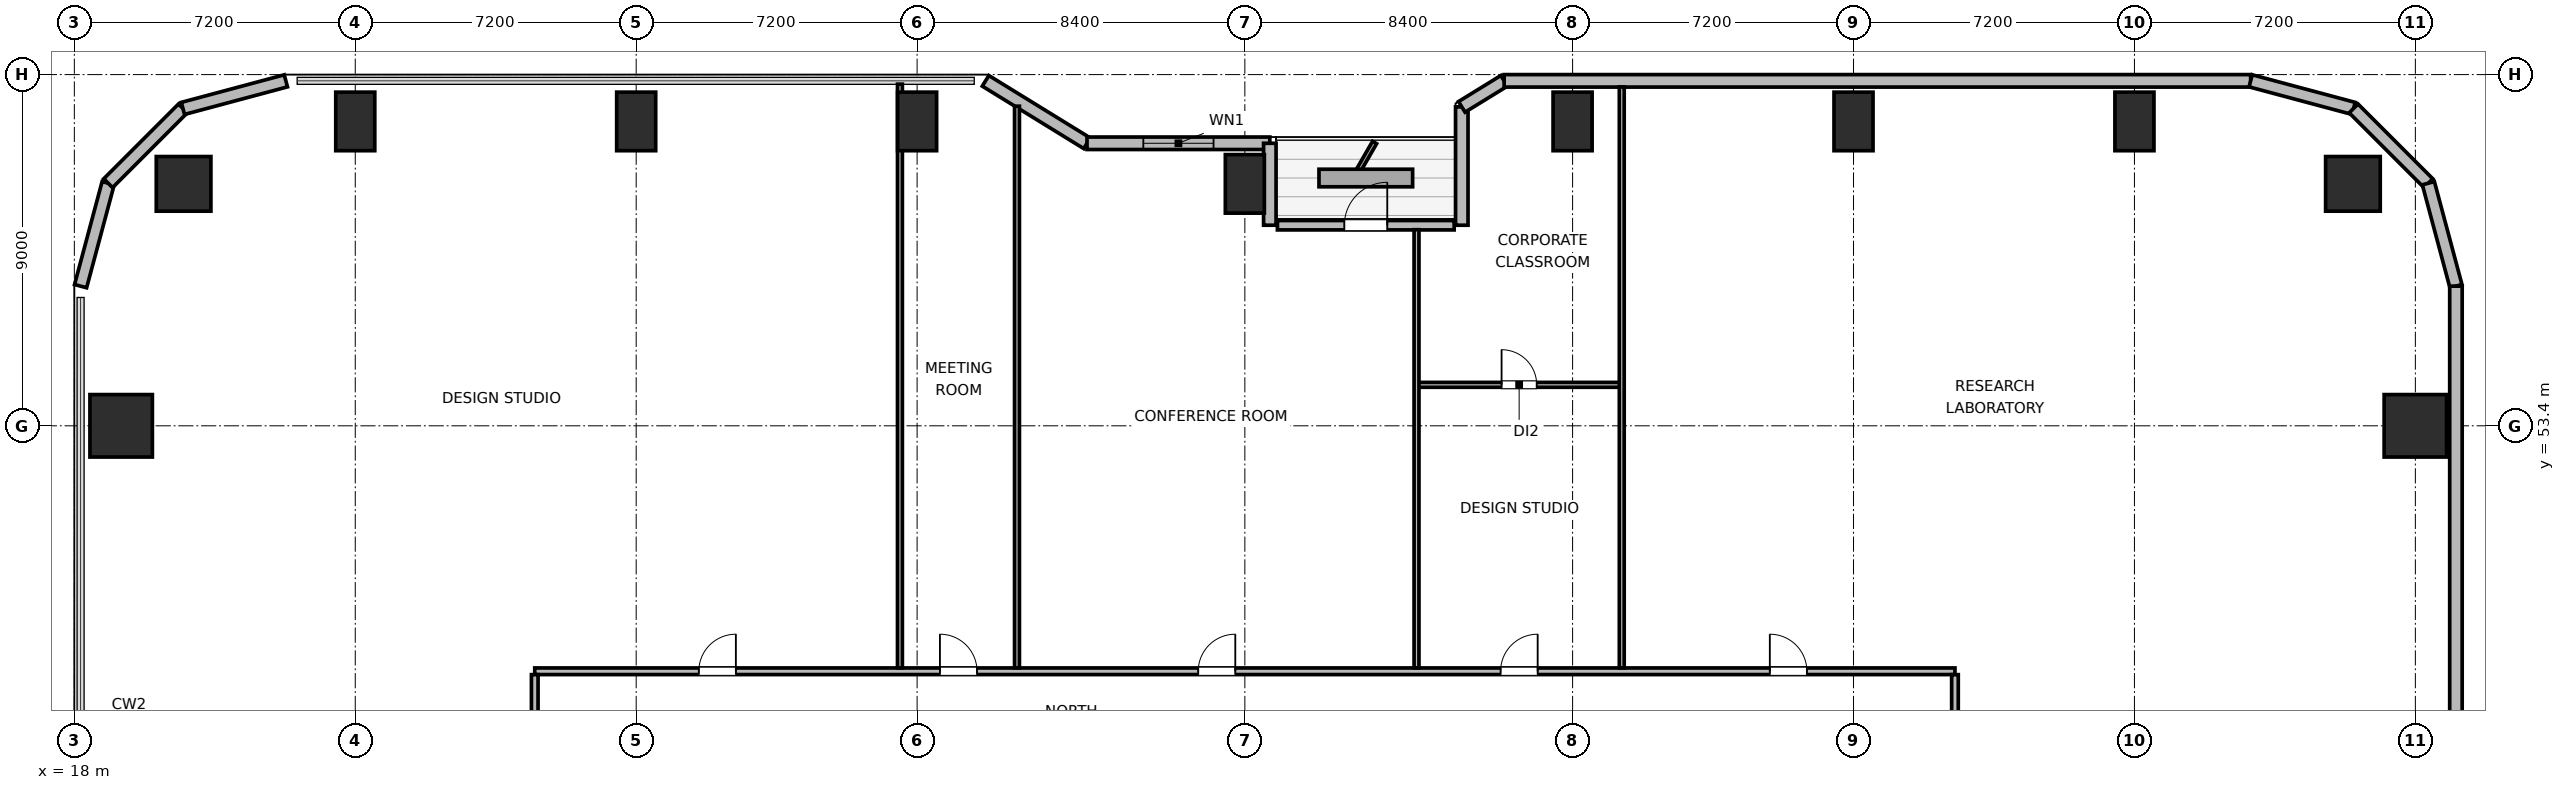
"""IFC4 building model, lengths in metres.
Left out: names, types, materials, properties, quantities, classifications, styles, units other than length and angle.
Written with IfcOpenShell. Run it as: python <this file> out.ifc"""

import sys

from ifc_helpers import new_model, si_unit, direction, frame, frame_2d, origin, origin_2d, place, context, subcontext, project, spatial, rectangle, circle, extrude, element, fill, save


model = new_model("IFC4")
c1 = context("Model", 3, precision=1e-05, world=origin(), true_north=direction((0.0, 1.0)))
c2 = subcontext(c1, "Body", "Model", "MODEL_VIEW")
j1 = project(units=[si_unit("LENGTHUNIT", "METRE"), si_unit("PLANEANGLEUNIT", "RADIAN")], contexts=[c1])
p1 = place(None, origin())
s1 = spatial("IfcSite", under=j1, at=p1, CompositionType="ELEMENT")
p2 = place(p1, origin())
s2 = spatial("IfcBuilding", under=s1, at=p2, CompositionType="ELEMENT")
p3 = place(p2, frame((0.0, 0.0, 52.8)))
s3 = spatial("IfcBuildingStorey", under=s2, at=p3, CompositionType="ELEMENT", Elevation=52.8)
for number, where, z_axis, x_axis in (
    (1, (76.4, 59.6, 0.0), (0.0, 0.0, 1.0), (1.0, 0.0, 0.0)),
    (2, (20.8, 59.6, 0.0), (0.0, 0.0, 1.0), (1.0, 0.0, 0.0)),
):
    element("IfcColumn", number, at=place(p3, frame(where, z_axis=z_axis, x_axis=x_axis)), inside=s3, PredefinedType="COLUMN", context=c2, shape_type="SweptSolid", body=[
        extrude(circle(Radius=0.7, at=origin_2d()), origin(), (0.0, 0.0, 1.0), 3.9),
    ])
for number, where, z_axis, x_axis in (
    (3, (25.2, 61.2, 0.0), (0.0, 0.0, 1.0), (1.0, 0.0, 0.0)),
    (4, (32.4, 61.2, 0.0), (0.0, 0.0, 1.0), (1.0, 0.0, 0.0)),
    (5, (39.6, 61.2, 0.0), (0.0, 0.0, 1.0), (1.0, 0.0, 0.0)),
    (6, (48.0, 59.6, 0.0), (0.0, 0.0, 1.0), (1.0, 0.0, 0.0)),
    (7, (56.4, 61.2, 0.0), (0.0, 0.0, 1.0), (1.0, 0.0, 0.0)),
    (8, (63.6, 61.2, 0.0), (0.0, 0.0, 1.0), (1.0, 0.0, 0.0)),
    (9, (70.8, 61.2, 0.0), (0.0, 0.0, 1.0), (1.0, 0.0, 0.0)),
):
    element("IfcColumn", number, at=place(p3, frame(where, z_axis=z_axis, x_axis=x_axis)), inside=s3, PredefinedType="COLUMN", context=c2, shape_type="SweptSolid", body=[
        extrude(rectangle(XDim=1.0, YDim=1.5, at=origin_2d()), origin(), (0.0, 0.0, 1.0), 3.9),
    ])
for number, where, z_axis, x_axis in (
    (10, (19.2, 53.4, 0.0), (0.0, 0.0, 1.0), (1.0, 0.0, 0.0)),
    (11, (78.0, 53.4, 0.0), (0.0, 0.0, 1.0), (1.0, 0.0, 0.0)),
):
    element("IfcColumn", number, at=place(p3, frame(where, z_axis=z_axis, x_axis=x_axis)), inside=s3, PredefinedType="COLUMN", context=c2, shape_type="SweptSolid", body=[
        extrude(rectangle(XDim=1.6, YDim=1.6, at=origin_2d()), origin(), (0.0, 0.0, 1.0), 3.9),
    ])
p4 = place(p3, frame((18.16, 56.979, 0.0), z_axis=(0.0, 0.0, 1.0), x_axis=(0.25869736047, 0.965958423373, 0.0)))
e12 = element("IfcWall", 12, at=p4, inside=s3, PredefinedType="SOLIDWALL", context=c2, shape_type="SweptSolid", body=[
    extrude(rectangle(XDim=2.731, YDim=0.32, at=frame_2d((1.366, 0.0))), origin(), (0.0, 0.0, 1.0), 3.64),
])
p5 = place(p3, frame((18.866, 59.617, 0.0), z_axis=(0.0, 0.0, 1.0), x_axis=(0.707106781187, 0.707106781187, 0.0)))
e13 = element("IfcWall", 13, at=p5, inside=s3, PredefinedType="SOLIDWALL", context=c2, shape_type="SweptSolid", body=[
    extrude(rectangle(XDim=2.71, YDim=0.32, at=frame_2d((1.355, 0.0))), origin(), (0.0, 0.0, 1.0), 3.64),
])
p6 = place(p3, frame((20.783, 61.533, 0.0), z_axis=(0.0, 0.0, 1.0), x_axis=(0.965964405026, 0.25867502435, 0.0)))
e14 = element("IfcWall", 14, at=p6, inside=s3, PredefinedType="SOLIDWALL", context=c2, shape_type="SweptSolid", body=[
    extrude(rectangle(XDim=2.731, YDim=0.32, at=frame_2d((1.366, 0.0))), origin(), (0.0, 0.0, 1.0), 3.64),
])
p7 = place(p3, frame((41.355, 62.24, 0.0), z_axis=(0.0, 0.0, 1.0), x_axis=(0.851630857047, -0.524142044989, 0.0)))
e15 = element("IfcWall", 15, at=p7, inside=s3, PredefinedType="SOLIDWALL", context=c2, shape_type="SweptSolid", body=[
    extrude(rectangle(XDim=3.053, YDim=0.32, at=frame_2d((1.526, 0.0))), origin(), (0.0, 0.0, 1.0), 2.875),
])
p8 = place(p3, frame((43.955, 60.64, 0.0), z_axis=(0.0, 0.0, 1.0), x_axis=(1.0, 0.0, 0.0)))
e16 = element("IfcWall", 16, at=p8, inside=s3, PredefinedType="SOLIDWALL", context=c2, shape_type="SweptSolid", body=[
    extrude(rectangle(XDim=4.685, YDim=0.32, at=frame_2d((2.343, 0.0))), origin(), (0.0, 0.0, 1.0), 2.875),
])
p9 = place(p8, frame((1.443, 0.0, 0.85)))
e17 = element("IfcOpeningElement", 17, at=p9, cuts=e16, PredefinedType="OPENING", context=c2, shape_type="SweptSolid", body=[
    extrude(rectangle(XDim=1.8, YDim=1.1, at=frame_2d((0.9, 0.55))), frame((0.0, 0.17, 0.0), z_axis=(0.0, -1.0, 0.0), x_axis=(1.0, 0.0, 0.0)), (0.0, 0.0, 1.0), 0.34),
])
p10 = place(p3, frame((48.64, 60.64, 0.0), z_axis=(0.0, 0.0, 1.0), x_axis=(0.0, -1.0, 0.0)))
e18 = element("IfcWall", 18, at=p10, inside=s3, PredefinedType="SOLIDWALL", context=c2, shape_type="SweptSolid", body=[
    extrude(rectangle(XDim=2.1, YDim=0.32, at=frame_2d((1.05, 0.0))), origin(), (0.0, 0.0, 1.0), 2.875),
])
p11 = place(p3, frame((48.835, 58.54, 0.0), z_axis=(0.0, 0.0, 1.0), x_axis=(1.0, 0.0, 0.0)))
e19 = element("IfcWall", 19, at=p11, inside=s3, PredefinedType="SOLIDWALL", context=c2, shape_type="SweptSolid", body=[
    extrude(rectangle(XDim=4.53, YDim=0.24, at=frame_2d((2.265, 0.0))), origin(), (0.0, 0.0, 1.0), 3.64),
])
p12 = place(p11, frame((1.715, 0.0, 0.0)))
e20 = element("IfcOpeningElement", 20, at=p12, cuts=e19, PredefinedType="OPENING", context=c2, shape_type="SweptSolid", body=[
    extrude(rectangle(XDim=1.1, YDim=2.04, at=frame_2d((0.55, 1.02))), frame((0.0, 0.13, 0.0), z_axis=(0.0, -1.0, 0.0), x_axis=(1.0, 0.0, 0.0)), (0.0, 0.0, 1.0), 0.26),
])
p13 = place(p3, frame((53.56, 58.54, 0.0), z_axis=(0.0, 0.0, 1.0), x_axis=(0.0, 1.0, 0.0)))
e21 = element("IfcWall", 21, at=p13, inside=s3, PredefinedType="SOLIDWALL", context=c2, shape_type="SweptSolid", body=[
    extrude(rectangle(XDim=3.032, YDim=0.32, at=frame_2d((1.516, 0.0))), origin(), (0.0, 0.0, 1.0), 2.875),
])
p14 = place(p3, frame((53.56, 61.573, 0.0), z_axis=(0.0, 0.0, 1.0), x_axis=(0.851776724646, 0.523904964045, 0.0)))
e22 = element("IfcWall", 22, at=p14, inside=s3, PredefinedType="SOLIDWALL", context=c2, shape_type="SweptSolid", body=[
    extrude(rectangle(XDim=1.274, YDim=0.32, at=frame_2d((0.637, 0.0))), origin(), (0.0, 0.0, 1.0), 3.64),
])
p15 = place(p3, frame((54.645, 62.24, 0.0), z_axis=(0.0, 0.0, 1.0), x_axis=(1.0, 0.0, 0.0)))
e23 = element("IfcWall", 23, at=p15, inside=s3, PredefinedType="SOLIDWALL", context=c2, shape_type="SweptSolid", body=[
    extrude(rectangle(XDim=19.134, YDim=0.32, at=frame_2d((9.567, 0.0))), origin(), (0.0, 0.0, 1.0), 3.64),
])
p16 = place(p3, frame((73.779, 62.24, 0.0), z_axis=(0.0, 0.0, 1.0), x_axis=(0.965964405026, -0.25867502435, 0.0)))
e24 = element("IfcWall", 24, at=p16, inside=s3, PredefinedType="SOLIDWALL", context=c2, shape_type="SweptSolid", body=[
    extrude(rectangle(XDim=2.731, YDim=0.32, at=frame_2d((1.366, 0.0))), origin(), (0.0, 0.0, 1.0), 3.64),
])
p17 = place(p3, frame((76.417, 61.533, 0.0), z_axis=(0.0, 0.0, 1.0), x_axis=(0.707106781187, -0.707106781187, 0.0)))
e25 = element("IfcWall", 25, at=p17, inside=s3, PredefinedType="SOLIDWALL", context=c2, shape_type="SweptSolid", body=[
    extrude(rectangle(XDim=2.71, YDim=0.32, at=frame_2d((1.355, 0.0))), origin(), (0.0, 0.0, 1.0), 3.64),
])
p18 = place(p3, frame((78.333, 59.617, 0.0), z_axis=(0.0, 0.0, 1.0), x_axis=(0.25869736047, -0.965958423373, 0.0)))
e26 = element("IfcWall", 26, at=p18, inside=s3, PredefinedType="SOLIDWALL", context=c2, shape_type="SweptSolid", body=[
    extrude(rectangle(XDim=2.731, YDim=0.32, at=frame_2d((1.366, 0.0))), origin(), (0.0, 0.0, 1.0), 3.64),
])
p19 = place(p3, frame((79.04, 56.979, 0.0), z_axis=(0.0, 0.0, 1.0), x_axis=(0.0, -1.0, 0.0)))
e27 = element("IfcWall", 27, at=p19, inside=s3, PredefinedType="SOLIDWALL", context=c2, shape_type="SweptSolid", body=[
    extrude(rectangle(XDim=14.219, YDim=0.32, at=frame_2d((7.109, 0.0))), origin(), (0.0, 0.0, 1.0), 3.64),
])
p20 = place(p3, frame((29.8, 47.11, 0.0), z_axis=(0.0, 0.0, 1.0), x_axis=(1.0, 0.0, 0.0)))
e28 = element("IfcWall", 28, at=p20, inside=s3, PredefinedType="PARTITIONING", context=c2, shape_type="SweptSolid", body=[
    extrude(rectangle(XDim=36.4, YDim=0.17, at=frame_2d((18.2, 0.0))), origin(), (0.0, 0.0, 1.0), 3.64),
])
p21 = place(p20, frame((4.205, 0.0, 0.0)))
e29 = element("IfcOpeningElement", 29, at=p21, cuts=e28, PredefinedType="OPENING", context=c2, shape_type="SweptSolid", body=[
    extrude(rectangle(XDim=0.95, YDim=2.04, at=frame_2d((0.475, 1.02))), frame((0.0, 0.095, 0.0), z_axis=(0.0, -1.0, 0.0), x_axis=(1.0, 0.0, 0.0)), (0.0, 0.0, 1.0), 0.19),
])
p22 = place(p20, frame((10.385, 0.0, 0.0)))
e30 = element("IfcOpeningElement", 30, at=p22, cuts=e28, PredefinedType="OPENING", context=c2, shape_type="SweptSolid", body=[
    extrude(rectangle(XDim=0.95, YDim=2.04, at=frame_2d((0.475, 1.02))), frame((0.0, 0.095, 0.0), z_axis=(0.0, -1.0, 0.0), x_axis=(1.0, 0.0, 0.0)), (0.0, 0.0, 1.0), 0.19),
])
p23 = place(p20, frame((17.005, 0.0, 0.0)))
e31 = element("IfcOpeningElement", 31, at=p23, cuts=e28, PredefinedType="OPENING", context=c2, shape_type="SweptSolid", body=[
    extrude(rectangle(XDim=0.95, YDim=2.04, at=frame_2d((0.475, 1.02))), frame((0.0, 0.095, 0.0), z_axis=(0.0, -1.0, 0.0), x_axis=(1.0, 0.0, 0.0)), (0.0, 0.0, 1.0), 0.19),
])
p24 = place(p20, frame((24.755, 0.0, 0.0)))
e32 = element("IfcOpeningElement", 32, at=p24, cuts=e28, PredefinedType="OPENING", context=c2, shape_type="SweptSolid", body=[
    extrude(rectangle(XDim=0.95, YDim=2.04, at=frame_2d((0.475, 1.02))), frame((0.0, 0.095, 0.0), z_axis=(0.0, -1.0, 0.0), x_axis=(1.0, 0.0, 0.0)), (0.0, 0.0, 1.0), 0.19),
])
p25 = place(p20, frame((31.655, 0.0, 0.0)))
e33 = element("IfcOpeningElement", 33, at=p25, cuts=e28, PredefinedType="OPENING", context=c2, shape_type="SweptSolid", body=[
    extrude(rectangle(XDim=0.95, YDim=2.04, at=frame_2d((0.475, 1.02))), frame((0.0, 0.095, 0.0), z_axis=(0.0, -1.0, 0.0), x_axis=(1.0, 0.0, 0.0)), (0.0, 0.0, 1.0), 0.19),
])
p26 = place(p3, frame((29.8, 24.977, 0.0), z_axis=(0.0, 0.0, 1.0), x_axis=(0.0, 1.0, 0.0)))
e34 = element("IfcWall", 34, at=p26, inside=s3, PredefinedType="PARTITIONING", context=c2, shape_type="SweptSolid", body=[
    extrude(rectangle(XDim=22.046, YDim=0.17, at=frame_2d((11.023, 0.0))), origin(), (0.0, 0.0, 1.0), 3.64),
])
p27 = place(p26, frame((10.548, 0.0, 0.0)))
e35 = element("IfcOpeningElement", 35, at=p27, cuts=e34, PredefinedType="OPENING", context=c2, shape_type="SweptSolid", body=[
    extrude(rectangle(XDim=0.95, YDim=2.04, at=frame_2d((0.475, 1.02))), frame((0.0, 0.095, 0.0), z_axis=(0.0, -1.0, 0.0), x_axis=(1.0, 0.0, 0.0)), (0.0, 0.0, 1.0), 0.19),
])
p28 = place(p3, frame((66.2, 24.977, 0.0), z_axis=(0.0, 0.0, 1.0), x_axis=(0.0, 1.0, 0.0)))
e36 = element("IfcWall", 36, at=p28, inside=s3, PredefinedType="PARTITIONING", context=c2, shape_type="SweptSolid", body=[
    extrude(rectangle(XDim=22.046, YDim=0.17, at=frame_2d((11.023, 0.0))), origin(), (0.0, 0.0, 1.0), 3.64),
])
p29 = place(p28, frame((4.493, 0.0, 0.0)))
e37 = element("IfcOpeningElement", 37, at=p29, cuts=e36, PredefinedType="OPENING", context=c2, shape_type="SweptSolid", body=[
    extrude(rectangle(XDim=0.95, YDim=2.04, at=frame_2d((0.475, 1.02))), frame((0.0, 0.095, 0.0), z_axis=(0.0, -1.0, 0.0), x_axis=(1.0, 0.0, 0.0)), (0.0, 0.0, 1.0), 0.19),
])
p30 = place(p28, frame((15.603, 0.0, 0.0)))
e38 = element("IfcOpeningElement", 38, at=p30, cuts=e36, PredefinedType="OPENING", context=c2, shape_type="SweptSolid", body=[
    extrude(rectangle(XDim=0.95, YDim=2.04, at=frame_2d((0.475, 1.02))), frame((0.0, 0.095, 0.0), z_axis=(0.0, -1.0, 0.0), x_axis=(1.0, 0.0, 0.0)), (0.0, 0.0, 1.0), 0.19),
])
p31 = place(p3, frame((39.16, 47.197, 0.0), z_axis=(0.0, 0.0, 1.0), x_axis=(0.0, 1.0, 0.0)))
e39 = element("IfcWall", 39, at=p31, inside=s3, PredefinedType="PARTITIONING", context=c2, shape_type="SweptSolid", body=[
    extrude(rectangle(XDim=14.958, YDim=0.125, at=frame_2d((7.479, 0.0))), origin(), (0.0, 0.0, 1.0), 3.64),
])
p32 = place(p3, frame((42.16, 47.197, 0.0), z_axis=(0.0, 0.0, 1.0), x_axis=(0.0, 1.0, 0.0)))
e40 = element("IfcWall", 40, at=p32, inside=s3, PredefinedType="PARTITIONING", context=c2, shape_type="SweptSolid", body=[
    extrude(rectangle(XDim=14.393, YDim=0.125, at=frame_2d((7.197, 0.0))), origin(), (0.0, 0.0, 1.0), 3.003),
])
p33 = place(p3, frame((52.4, 54.45, 0.0), z_axis=(0.0, 0.0, 1.0), x_axis=(1.0, 0.0, 0.0)))
e41 = element("IfcWall", 41, at=p33, inside=s3, PredefinedType="PARTITIONING", context=c2, shape_type="SweptSolid", body=[
    extrude(rectangle(XDim=5.26, YDim=0.125, at=frame_2d((2.63, 0.0))), origin(), (0.0, 0.0, 1.0), 3.64),
])
p34 = place(p33, frame((2.18, 0.0, 0.0)))
e42 = element("IfcOpeningElement", 42, at=p34, cuts=e41, PredefinedType="OPENING", context=c2, shape_type="SweptSolid", body=[
    extrude(rectangle(XDim=0.9, YDim=2.02, at=frame_2d((0.45, 1.01))), frame((0.0, 0.073, 0.0), z_axis=(0.0, -1.0, 0.0), x_axis=(1.0, 0.0, 0.0)), (0.0, 0.0, 1.0), 0.145),
])
p35 = place(p3, frame((52.4, 47.197, 0.0), z_axis=(0.0, 0.0, 1.0), x_axis=(0.0, 1.0, 0.0)))
e43 = element("IfcWall", 43, at=p35, inside=s3, PredefinedType="PARTITIONING", context=c2, shape_type="SweptSolid", body=[
    extrude(rectangle(XDim=11.228, YDim=0.125, at=frame_2d((5.614, 0.0))), origin(), (0.0, 0.0, 1.0), 3.003),
])
p36 = place(p3, frame((57.66, 47.197, 0.0), z_axis=(0.0, 0.0, 1.0), x_axis=(0.0, 1.0, 0.0)))
e44 = element("IfcWall", 44, at=p36, inside=s3, PredefinedType="PARTITIONING", context=c2, shape_type="SweptSolid", body=[
    extrude(rectangle(XDim=14.888, YDim=0.125, at=frame_2d((7.444, 0.0))), origin(), (0.0, 0.0, 1.0), 3.64),
])
p37 = place(p9, origin())
e45 = element("IfcWindow", 45, at=p37, inside=s3, PartitioningType="SINGLE_PANEL", PredefinedType="WINDOW", context=c2, shape_type="SweptSolid", body=[
    extrude(rectangle(XDim=1.8, YDim=1.1, at=frame_2d((0.9, 0.55))), frame((0.0, 0.03, 0.0), z_axis=(0.0, -1.0, 0.0), x_axis=(1.0, 0.0, 0.0)), (0.0, 0.0, 1.0), 0.06),
])
fill(e17, e45)
p38 = place(p12, origin())
e46 = element("IfcDoor", 46, at=p38, inside=s3, OperationType="SINGLE_SWING_RIGHT", PredefinedType="DOOR", context=c2, shape_type="SweptSolid", body=[
    extrude(rectangle(XDim=1.1, YDim=2.04, at=frame_2d((0.55, 1.02))), frame((0.0, 0.025, 0.0), z_axis=(0.0, -1.0, 0.0), x_axis=(1.0, 0.0, 0.0)), (0.0, 0.0, 1.0), 0.05),
])
fill(e20, e46)
p39 = place(p21, origin())
e47 = element("IfcDoor", 47, at=p39, inside=s3, OperationType="SINGLE_SWING_RIGHT", PredefinedType="DOOR", context=c2, shape_type="SweptSolid", body=[
    extrude(rectangle(XDim=0.95, YDim=2.04, at=frame_2d((0.475, 1.02))), frame((0.0, 0.025, 0.0), z_axis=(0.0, -1.0, 0.0), x_axis=(1.0, 0.0, 0.0)), (0.0, 0.0, 1.0), 0.05),
])
fill(e29, e47)
p40 = place(p22, origin())
e48 = element("IfcDoor", 48, at=p40, inside=s3, OperationType="SINGLE_SWING_LEFT", PredefinedType="DOOR", context=c2, shape_type="SweptSolid", body=[
    extrude(rectangle(XDim=0.95, YDim=2.04, at=frame_2d((0.475, 1.02))), frame((0.0, 0.025, 0.0), z_axis=(0.0, -1.0, 0.0), x_axis=(1.0, 0.0, 0.0)), (0.0, 0.0, 1.0), 0.05),
])
fill(e30, e48)
p41 = place(p23, origin())
e49 = element("IfcDoor", 49, at=p41, inside=s3, OperationType="SINGLE_SWING_RIGHT", PredefinedType="DOOR", context=c2, shape_type="SweptSolid", body=[
    extrude(rectangle(XDim=0.95, YDim=2.04, at=frame_2d((0.475, 1.02))), frame((0.0, 0.025, 0.0), z_axis=(0.0, -1.0, 0.0), x_axis=(1.0, 0.0, 0.0)), (0.0, 0.0, 1.0), 0.05),
])
fill(e31, e49)
p42 = place(p34, origin())
e50 = element("IfcDoor", 50, at=p42, inside=s3, OperationType="SINGLE_SWING_LEFT", PredefinedType="DOOR", context=c2, shape_type="SweptSolid", body=[
    extrude(rectangle(XDim=0.9, YDim=2.02, at=frame_2d((0.45, 1.01))), frame((0.0, 0.025, 0.0), z_axis=(0.0, -1.0, 0.0), x_axis=(1.0, 0.0, 0.0)), (0.0, 0.0, 1.0), 0.05),
])
fill(e42, e50)
p43 = place(p24, origin())
e51 = element("IfcDoor", 51, at=p43, inside=s3, OperationType="SINGLE_SWING_RIGHT", PredefinedType="DOOR", context=c2, shape_type="SweptSolid", body=[
    extrude(rectangle(XDim=0.95, YDim=2.04, at=frame_2d((0.475, 1.02))), frame((0.0, 0.025, 0.0), z_axis=(0.0, -1.0, 0.0), x_axis=(1.0, 0.0, 0.0)), (0.0, 0.0, 1.0), 0.05),
])
fill(e32, e51)
p44 = place(p25, origin())
e52 = element("IfcDoor", 52, at=p44, inside=s3, OperationType="SINGLE_SWING_LEFT", PredefinedType="DOOR", context=c2, shape_type="SweptSolid", body=[
    extrude(rectangle(XDim=0.95, YDim=2.04, at=frame_2d((0.475, 1.02))), frame((0.0, 0.025, 0.0), z_axis=(0.0, -1.0, 0.0), x_axis=(1.0, 0.0, 0.0)), (0.0, 0.0, 1.0), 0.05),
])
fill(e33, e52)
save(model, sys.argv[1])
